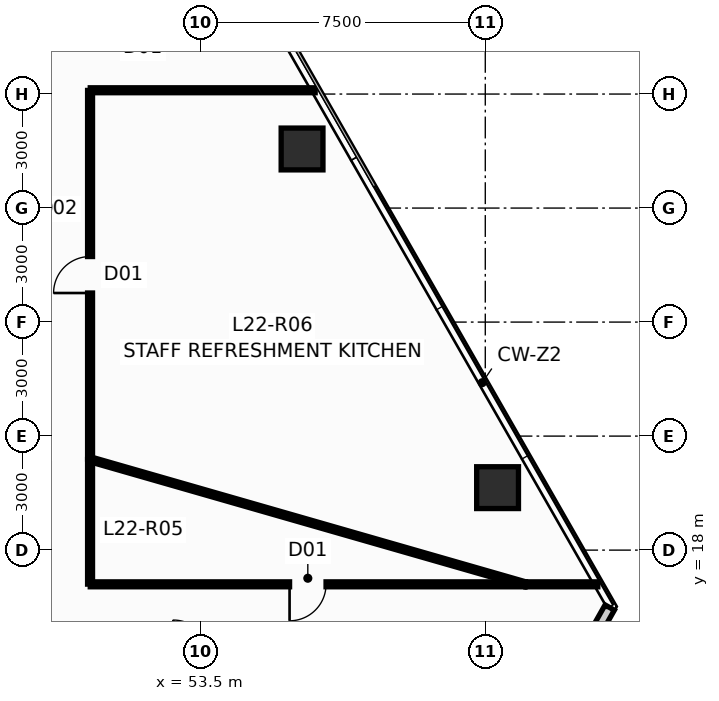
"""IFC4 building model, lengths in metres.
Left out: names, types, materials, properties, quantities, classifications, styles, units other than length and angle.
Written with IfcOpenShell. Run it as: python <this file> out.ifc"""

import sys

from ifc_helpers import new_model, si_unit, direction, frame, frame_2d, origin, origin_2d, place, context, subcontext, project, spatial, rectangle, hollow_rectangle, extrude, source, transform, mapped, element, fill, save


model = new_model("IFC4")
c1 = context("Model", 3, precision=1e-05, world=origin(), true_north=direction((0.0, 1.0)))
c2 = subcontext(c1, "Body", "Model", "MODEL_VIEW")
j1 = project(units=[si_unit("LENGTHUNIT", "METRE"), si_unit("PLANEANGLEUNIT", "RADIAN")], contexts=[c1])
p1 = place(None, origin())
s1 = spatial("IfcSite", under=j1, at=p1, CompositionType="ELEMENT")
p2 = place(p1, origin())
s2 = spatial("IfcBuilding", under=s1, at=p2, CompositionType="ELEMENT")
p3 = place(p2, frame((0.0, 0.0, 87.15)))
s3 = spatial("IfcBuildingStorey", under=s2, at=p3, CompositionType="ELEMENT", Elevation=87.15)
m1 = source(origin(), c2, "Body", "SweptSolid", [
    extrude(hollow_rectangle(XDim=1.1, YDim=1.1, WallThickness=0.06, at=origin_2d()), origin(), (0.0, 0.0, 1.0), 3.651),
])
p4 = place(p3, frame((61.323, 19.644, 0.0), z_axis=(-0.010431083049, -0.021597691184, 0.999712324742), x_axis=(0.900476348161, -0.434904985489, 0.0)))
e1 = element("IfcColumn", 1, at=p4, inside=s3, PredefinedType="COLUMN", context=c2, shape_type="MappedRepresentation", body=[
    mapped(m1, transform((0.0, 0.0, 0.0), scale=1.0)),
])
m2 = source(origin(), c2, "Body", "SweptSolid", [
    extrude(hollow_rectangle(XDim=1.1, YDim=1.1, WallThickness=0.06, at=origin_2d()), origin(), (0.0, 0.0, 1.0), 3.651),
])
p5 = place(p3, frame((56.179, 28.555, 0.0), z_axis=(-0.014912316331, -0.013775502979, 0.999793907933), x_axis=(0.678553674548, -0.734550822447, 0.0)))
e2 = element("IfcColumn", 2, at=p5, inside=s3, PredefinedType="COLUMN", context=c2, shape_type="MappedRepresentation", body=[
    mapped(m2, transform((0.0, 0.0, 0.0), scale=1.0)),
])
p6 = place(p3, frame((64.274, 16.489, 0.0), z_axis=(0.0, 0.0, 1.0), x_axis=(-0.491673093899, -0.870779862385, 0.0)))
e3 = element("IfcWall", 3, at=p6, inside=s3, PredefinedType="STANDARD", context=c2, shape_type="SweptSolid", body=[
    extrude(rectangle(XDim=13.048, YDim=0.28, at=frame_2d((6.524, 0.0))), origin(), (0.0, 0.0, 1.0), 3.4),
])
p7 = place(p6, frame((5.62, 0.0, 0.9)))
e4 = element("IfcOpeningElement", 4, at=p7, cuts=e3, PredefinedType="OPENING", context=c2, shape_type="SweptSolid", body=[
    extrude(rectangle(XDim=1.8, YDim=1.8, at=frame_2d((0.9, 0.9))), frame((0.0, 0.152, 0.0), z_axis=(0.0, -1.0, 0.0), x_axis=(1.0, 0.0, 0.0)), (0.0, 0.0, 1.0), 0.304),
])
p8 = place(p3, frame((50.605, 20.389, 0.0), z_axis=(0.0, 0.0, 1.0), x_axis=(0.961158846522, -0.27599578213, 0.0)))
e5 = element("IfcWall", 5, at=p8, inside=s3, PredefinedType="PARTITIONING", context=c2, shape_type="SweptSolid", body=[
    extrude(rectangle(XDim=11.913, YDim=0.13, at=frame_2d((5.956, 0.0))), origin(), (0.0, 0.0, 1.0), 3.4),
])
p9 = place(p3, frame((62.055, 17.1, 0.0), z_axis=(0.0, 0.0, 1.0), x_axis=(-1.0, 0.0, 0.0)))
e6 = element("IfcWall", 6, at=p9, inside=s3, PredefinedType="PARTITIONING", context=c2, shape_type="SweptSolid", body=[
    extrude(rectangle(XDim=11.45, YDim=0.13, at=frame_2d((5.725, 0.0))), origin(), (0.0, 0.0, 1.0), 3.4),
])
p10 = place(p9, frame((5.245, 0.0, 0.0)))
e7 = element("IfcOpeningElement", 7, at=p10, cuts=e6, PredefinedType="OPENING", context=c2, shape_type="SweptSolid", body=[
    extrude(rectangle(XDim=0.96, YDim=2.15, at=frame_2d((0.48, 1.075))), frame((0.0, 0.077, 0.0), z_axis=(0.0, -1.0, 0.0), x_axis=(1.0, 0.0, 0.0)), (0.0, 0.0, 1.0), 0.154),
])
p11 = place(p3, frame((50.6, 20.395, 0.0), z_axis=(0.0, 0.0, 1.0), x_axis=(0.0, 1.0, 0.0)))
e8 = element("IfcWall", 8, at=p11, inside=s3, PredefinedType="PARTITIONING", context=c2, shape_type="SweptSolid", body=[
    extrude(rectangle(XDim=9.7, YDim=0.13, at=frame_2d((4.85, 0.0))), origin(), (0.0, 0.0, 1.0), 3.027),
])
p12 = place(p11, frame((4.37, 0.0, 0.0)))
e9 = element("IfcOpeningElement", 9, at=p12, cuts=e8, PredefinedType="OPENING", context=c2, shape_type="SweptSolid", body=[
    extrude(rectangle(XDim=0.96, YDim=2.15, at=frame_2d((0.48, 1.075))), frame((0.0, 0.077, 0.0), z_axis=(0.0, -1.0, 0.0), x_axis=(1.0, 0.0, 0.0)), (0.0, 0.0, 1.0), 0.154),
])
p13 = place(p3, frame((50.605, 30.1, 0.0), z_axis=(0.0, 0.0, 1.0), x_axis=(1.0, 0.0, 0.0)))
e10 = element("IfcWall", 10, at=p13, inside=s3, PredefinedType="PARTITIONING", context=c2, shape_type="SweptSolid", body=[
    extrude(rectangle(XDim=5.918, YDim=0.13, at=frame_2d((2.959, 0.0))), origin(), (0.0, 0.0, 1.0), 3.4),
])
p14 = place(p3, frame((50.6, 17.105, 0.0), z_axis=(0.0, 0.0, 1.0), x_axis=(0.0, 1.0, 0.0)))
e11 = element("IfcWall", 11, at=p14, inside=s3, PredefinedType="PARTITIONING", context=c2, shape_type="SweptSolid", body=[
    extrude(rectangle(XDim=3.28, YDim=0.13, at=frame_2d((1.64, 0.0))), origin(), (0.0, 0.0, 1.0), 3.027),
])
p15 = place(p3, frame((62.065, 17.1, 0.0), z_axis=(0.0, 0.0, 1.0), x_axis=(1.0, 0.0, 0.0)))
e12 = element("IfcWall", 12, at=p15, inside=s3, PredefinedType="PARTITIONING", context=c2, shape_type="SweptSolid", body=[
    extrude(rectangle(XDim=1.895, YDim=0.13, at=frame_2d((0.948, 0.0))), origin(), (0.0, 0.0, 1.0), 3.4),
])
p16 = place(p10, origin())
e13 = element("IfcDoor", 13, at=p16, inside=s3, OperationType="SINGLE_SWING_RIGHT", PredefinedType="DOOR", context=c2, shape_type="SweptSolid", body=[
    extrude(rectangle(XDim=0.96, YDim=2.15, at=frame_2d((0.48, 1.075))), frame((0.0, 0.025, 0.0), z_axis=(0.0, -1.0, 0.0), x_axis=(1.0, 0.0, 0.0)), (0.0, 0.0, 1.0), 0.05),
])
fill(e7, e13)
p17 = place(p12, origin())
e14 = element("IfcDoor", 14, at=p17, inside=s3, OperationType="SINGLE_SWING_LEFT", PredefinedType="DOOR", context=c2, shape_type="SweptSolid", body=[
    extrude(rectangle(XDim=0.96, YDim=2.15, at=frame_2d((0.48, 1.075))), frame((0.0, 0.025, 0.0), z_axis=(0.0, -1.0, 0.0), x_axis=(1.0, 0.0, 0.0)), (0.0, 0.0, 1.0), 0.05),
])
fill(e9, e14)
save(model, sys.argv[1])
